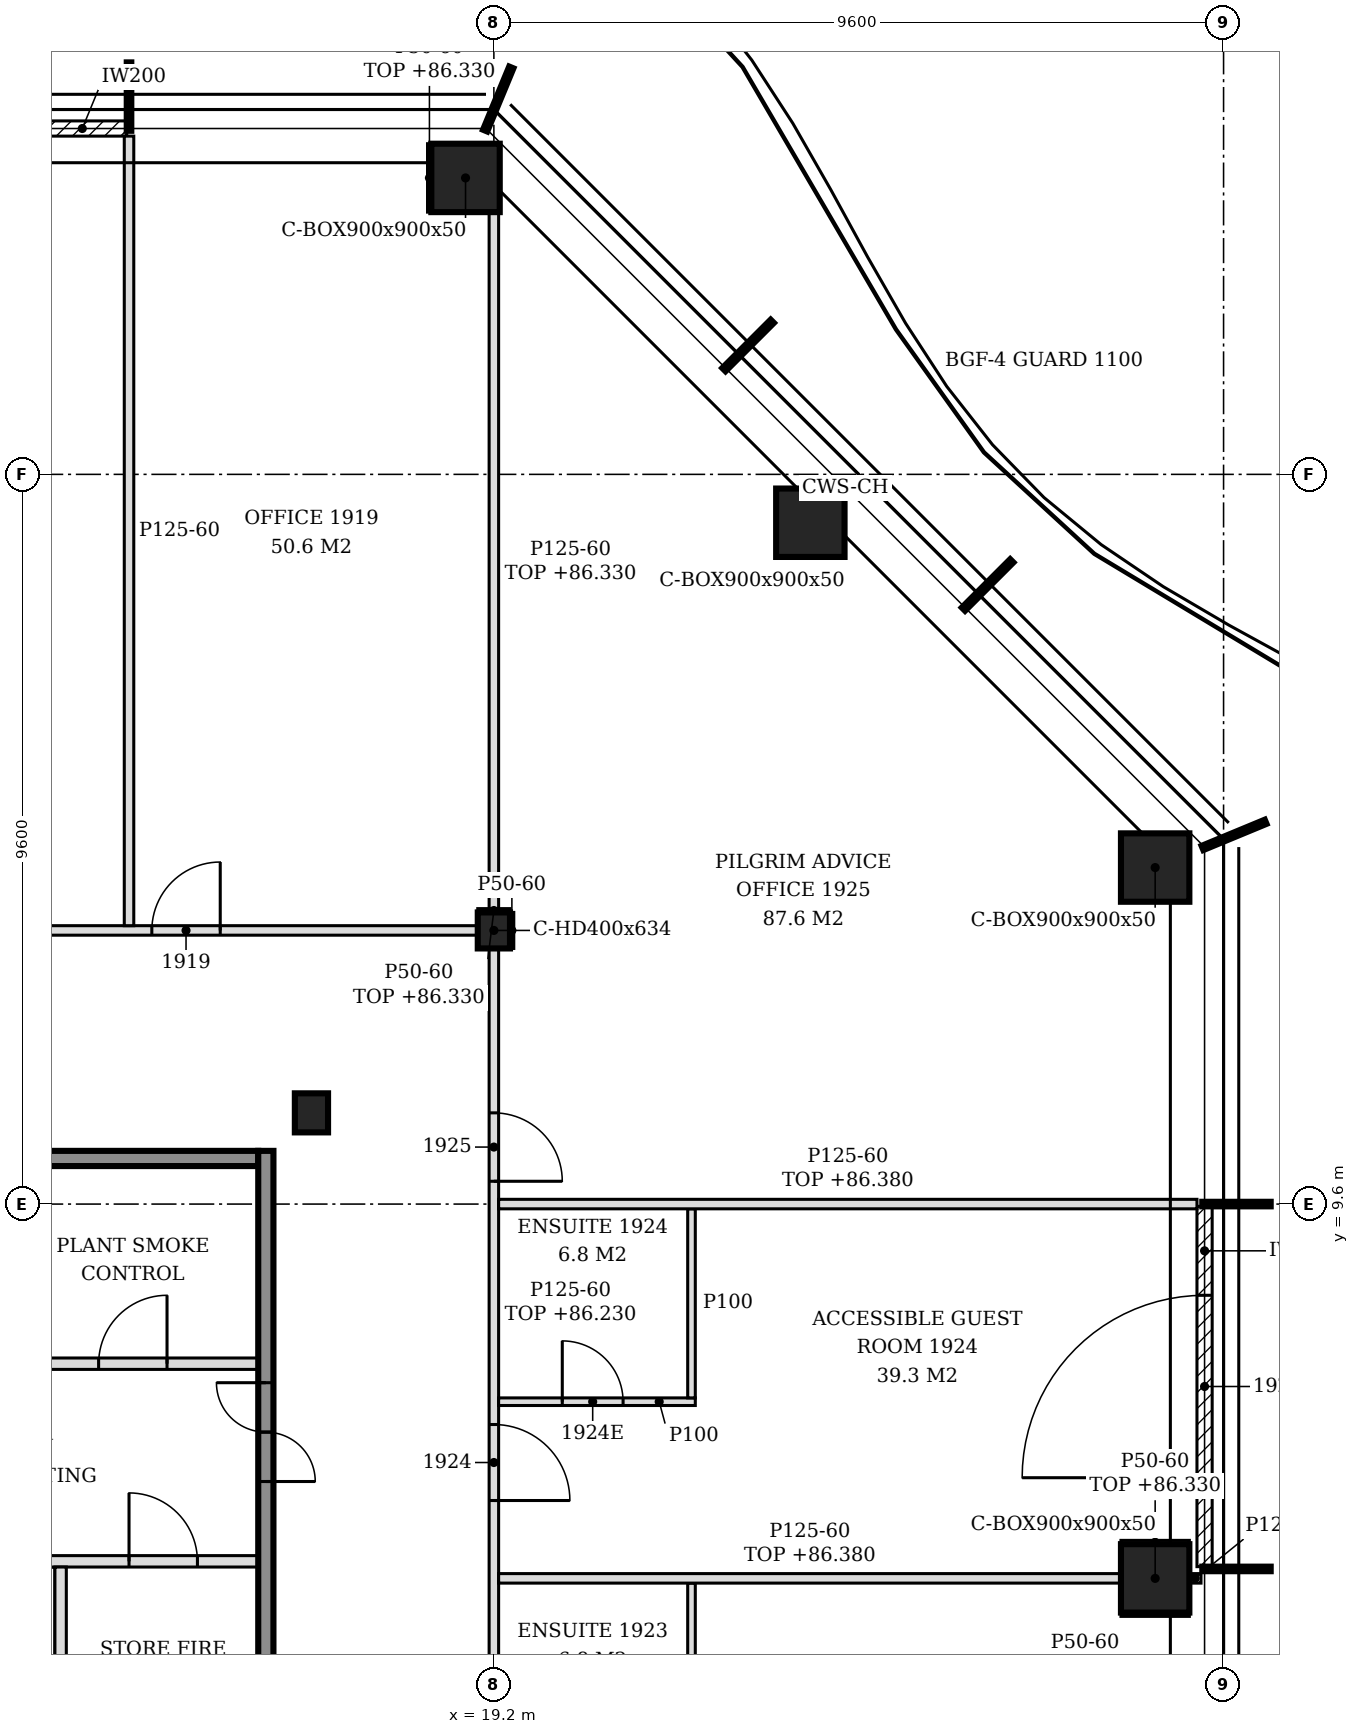
"""IFC4 building model, lengths in metres.
Left out: names, types, materials, properties, quantities, classifications, styles, units other than length and angle.
Written with IfcOpenShell. Run it as: python <this file> out.ifc"""

import sys

from ifc_helpers import new_model, si_unit, direction, frame, frame_2d, origin, origin_2d, place, context, subcontext, project, spatial, polyline, rectangle, hollow_rectangle, i_section, outline, extrude, clip, halfspace, element, fill, save


model = new_model("IFC4")
c1 = context("Model", 3, precision=1e-05, world=origin(), true_north=direction((0.0, 1.0)))
c2 = subcontext(c1, "Body", "Model", "MODEL_VIEW")
j1 = project(units=[si_unit("LENGTHUNIT", "METRE"), si_unit("PLANEANGLEUNIT", "RADIAN")], contexts=[c1])
p1 = place(None, origin())
s1 = spatial("IfcSite", under=j1, at=p1, CompositionType="ELEMENT")
p2 = place(p1, origin())
s2 = spatial("IfcBuilding", under=s1, at=p2, CompositionType="ELEMENT")
p3 = place(p2, frame((0.0, 0.0, 83.4)))
s3 = spatial("IfcBuildingStorey", under=s2, at=p3, CompositionType="ELEMENT", Elevation=83.4)
for number, where, z_axis, x_axis in (
    (1, (27.9, 4.676, -0.15), (0.0, 0.0, 1.0), (1.0, 0.0, 0.0)),
    (2, (27.9, 14.027, -0.15), (0.0, 0.0, 1.0), (1.0, 0.0, 0.0)),
    (3, (23.364, 18.564, -0.15), (0.0, 0.0, 1.0), (1.0, 0.0, 0.0)),
    (4, (18.827, 23.1, -0.15), (0.0, 0.0, 1.0), (1.0, 0.0, 0.0)),
):
    element("IfcColumn", number, at=place(p3, frame(where, z_axis=z_axis, x_axis=x_axis)), inside=s3, PredefinedType="COLUMN", context=c2, shape_type="Clipping", body=[
        clip(extrude(hollow_rectangle(XDim=0.9, YDim=0.9, WallThickness=0.05, at=origin_2d()), origin(), (0.0, 0.0, 1.0), 3.6), halfspace(frame((0.0, 0.0, 3.576), z_axis=(0.0, 0.0, 1.0), x_axis=(1.0, 0.0, 0.0)), False)),
    ])
p4 = place(p3, frame((19.2, 13.2, -0.15), z_axis=(0.0, 0.0, 1.0), x_axis=(1.0, 0.0, 0.0)))
e5 = element("IfcColumn", 5, at=p4, inside=s3, PredefinedType="COLUMN", context=c2, shape_type="SweptSolid", body=[
    extrude(i_section(OverallWidth=0.424, OverallDepth=0.474, WebThickness=0.048, FlangeThickness=0.077, FilletRadius=0.015, at=origin_2d()), origin(), (0.0, 0.0, 1.0), 3.6),
])
p5 = place(p3, frame((16.8, 10.8, -0.15), z_axis=(0.0, 0.0, 1.0), x_axis=(1.0, 0.0, 0.0)))
e6 = element("IfcColumn", 6, at=p5, inside=s3, PredefinedType="COLUMN", context=c2, shape_type="SweptSolid", body=[
    extrude(i_section(OverallWidth=0.437, OverallDepth=0.514, WebThickness=0.061, FlangeThickness=0.097, FilletRadius=0.015, at=origin_2d()), origin(), (0.0, 0.0, 1.0), 3.6),
])
p6 = place(p3, frame((28.55, 4.83, 0.0), z_axis=(0.0, 0.0, 1.0), x_axis=(0.0, 1.0, 0.0)))
e7 = element("IfcWall", 7, at=p6, inside=s3, PredefinedType="NOTDEFINED", context=c2, shape_type="SweptSolid", body=[
    extrude(rectangle(XDim=4.74, YDim=0.2, at=frame_2d((2.37, 0.0))), origin(), (0.0, 0.0, 1.0), 3.45),
])
p7 = place(p6, frame((1.17, 0.0, 0.0)))
e8 = element("IfcOpeningElement", 8, at=p7, cuts=e7, PredefinedType="OPENING", context=c2, shape_type="SweptSolid", body=[
    extrude(rectangle(XDim=2.4, YDim=2.4, at=frame_2d((1.2, 1.2))), frame((0.0, 0.11, 0.0), z_axis=(0.0, -1.0, 0.0), x_axis=(1.0, 0.0, 0.0)), (0.0, 0.0, 1.0), 0.22),
])
p8 = place(p3, frame((14.37, 23.75, 0.0), z_axis=(0.0, 0.0, 1.0), x_axis=(-1.0, 0.0, 0.0)))
e9 = element("IfcWall", 9, at=p8, inside=s3, PredefinedType="NOTDEFINED", context=c2, shape_type="SweptSolid", body=[
    extrude(rectangle(XDim=4.74, YDim=0.2, at=frame_2d((2.37, 0.0))), origin(), (0.0, 0.0, 1.0), 3.45),
])
p9 = place(p8, frame((1.17, 0.0, 0.0)))
e10 = element("IfcOpeningElement", 10, at=p9, cuts=e9, PredefinedType="OPENING", context=c2, shape_type="SweptSolid", body=[
    extrude(rectangle(XDim=2.4, YDim=2.4, at=frame_2d((1.2, 1.2))), frame((0.0, 0.11, 0.0), z_axis=(0.0, -1.0, 0.0), x_axis=(1.0, 0.0, 0.0)), (0.0, 0.0, 1.0), 0.22),
])
p10 = place(p3, frame((9.7, 4.9, 0.0), z_axis=(0.0, 0.0, 1.0), x_axis=(1.0, 0.0, 0.0)))
e11 = element("IfcWall", 11, at=p10, inside=s3, PredefinedType="SOLIDWALL", context=c2, shape_type="SweptSolid", body=[
    extrude(rectangle(XDim=6.4, YDim=0.15, at=frame_2d((3.2, 0.0))), origin(), (0.0, 0.0, 1.0), 3.45),
])
p11 = place(p10, frame((0.45, 0.0, 0.0)))
e12 = element("IfcOpeningElement", 12, at=p11, cuts=e11, PredefinedType="OPENING", context=c2, shape_type="SweptSolid", body=[
    extrude(rectangle(XDim=1.0, YDim=2.1, at=frame_2d((0.5, 1.05))), frame((0.0, 0.085, 0.0), z_axis=(0.0, -1.0, 0.0), x_axis=(1.0, 0.0, 0.0)), (0.0, 0.0, 1.0), 0.17),
])
p12 = place(p10, frame((2.35, 0.0, 0.0)))
e13 = element("IfcOpeningElement", 13, at=p12, cuts=e11, PredefinedType="OPENING", context=c2, shape_type="SweptSolid", body=[
    extrude(rectangle(XDim=1.0, YDim=2.1, at=frame_2d((0.5, 1.05))), frame((0.0, 0.085, 0.0), z_axis=(0.0, -1.0, 0.0), x_axis=(1.0, 0.0, 0.0)), (0.0, 0.0, 1.0), 0.17),
])
p13 = place(p10, frame((4.7, 0.0, 0.0)))
e14 = element("IfcOpeningElement", 14, at=p13, cuts=e11, PredefinedType="OPENING", context=c2, shape_type="SweptSolid", body=[
    extrude(rectangle(XDim=0.9, YDim=2.1, at=frame_2d((0.45, 1.05))), frame((0.0, 0.085, 0.0), z_axis=(0.0, -1.0, 0.0), x_axis=(1.0, 0.0, 0.0)), (0.0, 0.0, 1.0), 0.17),
])
p14 = place(p3, frame((12.7, 7.5, 0.0), z_axis=(0.0, 0.0, 1.0), x_axis=(1.0, 0.0, 0.0)))
e15 = element("IfcWall", 15, at=p14, inside=s3, PredefinedType="SOLIDWALL", context=c2, shape_type="SweptSolid", body=[
    extrude(rectangle(XDim=3.4, YDim=0.15, at=frame_2d((1.7, 0.0))), origin(), (0.0, 0.0, 1.0), 3.45),
])
p15 = place(p14, frame((1.3, 0.0, 0.0)))
e16 = element("IfcOpeningElement", 16, at=p15, cuts=e15, PredefinedType="OPENING", context=c2, shape_type="SweptSolid", body=[
    extrude(rectangle(XDim=0.9, YDim=2.1, at=frame_2d((0.45, 1.05))), frame((0.0, 0.085, 0.0), z_axis=(0.0, -1.0, 0.0), x_axis=(1.0, 0.0, 0.0)), (0.0, 0.0, 1.0), 0.17),
])
p16 = place(p3, frame((12.7, 10.2, 0.0), z_axis=(0.0, 0.0, 1.0), x_axis=(1.0, 0.0, 0.0)))
e17 = element("IfcWall", 17, at=p16, inside=s3, PredefinedType="SOLIDWALL", context=c2, shape_type="SweptSolid", body=[
    extrude(rectangle(XDim=3.4, YDim=0.2, at=frame_2d((1.7, 0.0))), origin(), (0.0, 0.0, 1.0), 3.45),
])
p17 = place(p3, frame((13.5, 2.275, 0.0), z_axis=(0.0, 0.0, 1.0), x_axis=(0.0, 1.0, 0.0)))
e18 = element("IfcWall", 18, at=p17, inside=s3, PredefinedType="SOLIDWALL", context=c2, shape_type="SweptSolid", body=[
    extrude(rectangle(XDim=2.55, YDim=0.15, at=frame_2d((1.275, 0.0))), origin(), (0.0, 0.0, 1.0), 3.45),
])
p18 = place(p3, frame((16.2, -5.5, 0.0), z_axis=(0.0, 0.0, 1.0), x_axis=(0.0, 1.0, 0.0)))
e19 = element("IfcWall", 19, at=p18, inside=s3, PredefinedType="SOLIDWALL", context=c2, shape_type="SweptSolid", body=[
    extrude(rectangle(XDim=15.8, YDim=0.2, at=frame_2d((7.9, 0.0))), origin(), (0.0, 0.0, 1.0), 3.45),
])
p19 = place(p18, frame((3.05, 0.0, 0.0)))
e20 = element("IfcOpeningElement", 20, at=p19, cuts=e19, PredefinedType="OPENING", context=c2, shape_type="SweptSolid", body=[
    extrude(rectangle(XDim=1.3, YDim=2.1, at=frame_2d((0.65, 1.05))), frame((0.0, 0.11, 0.0), z_axis=(0.0, -1.0, 0.0), x_axis=(1.0, 0.0, 0.0)), (0.0, 0.0, 1.0), 0.22),
])
p20 = place(p18, frame((11.45, 0.0, 0.0)))
e21 = element("IfcOpeningElement", 21, at=p20, cuts=e19, PredefinedType="OPENING", context=c2, shape_type="SweptSolid", body=[
    extrude(rectangle(XDim=1.3, YDim=2.1, at=frame_2d((0.65, 1.05))), frame((0.0, 0.11, 0.0), z_axis=(0.0, -1.0, 0.0), x_axis=(1.0, 0.0, 0.0)), (0.0, 0.0, 1.0), 0.22),
])
p21 = place(p3, frame((21.8, 2.126, 0.0), z_axis=(0.0, 0.0, 1.0), x_axis=(0.0, 1.0, 0.0)))
e22 = element("IfcWall", 22, at=p21, inside=s3, PredefinedType="PARTITIONING", context=c2, shape_type="SweptSolid", body=[
    extrude(rectangle(XDim=2.488, YDim=0.1, at=frame_2d((1.244, 0.0))), origin(), (0.0, 0.0, 1.0), 3.45),
])
p22 = place(p3, frame((19.2, 2.637, 0.0), z_axis=(0.0, 0.0, 1.0), x_axis=(0.0, 1.0, 0.0)))
e23 = element("IfcWall", 23, at=p22, inside=s3, PredefinedType="PARTITIONING", context=c2, shape_type="SweptSolid", body=[
    extrude(rectangle(XDim=10.326, YDim=0.125, at=frame_2d((5.163, 0.0))), origin(), (0.0, 0.0, 1.0), 2.83),
])
p23 = place(p22, frame((3.063, 0.0, 0.0)))
e24 = element("IfcOpeningElement", 24, at=p23, cuts=e23, PredefinedType="OPENING", context=c2, shape_type="SweptSolid", body=[
    extrude(rectangle(XDim=1.0, YDim=2.1, at=frame_2d((0.5, 1.05))), frame((0.0, 0.073, 0.0), z_axis=(0.0, -1.0, 0.0), x_axis=(1.0, 0.0, 0.0)), (0.0, 0.0, 1.0), 0.145),
])
p24 = place(p22, frame((7.263, 0.0, 0.0)))
e25 = element("IfcOpeningElement", 25, at=p24, cuts=e23, PredefinedType="OPENING", context=c2, shape_type="SweptSolid", body=[
    extrude(rectangle(XDim=0.9, YDim=2.1, at=frame_2d((0.45, 1.05))), frame((0.0, 0.073, 0.0), z_axis=(0.0, -1.0, 0.0), x_axis=(1.0, 0.0, 0.0)), (0.0, 0.0, 1.0), 0.145),
])
p25 = place(p3, frame((19.262, 4.676, 0.0), z_axis=(0.0, 0.0, 1.0), x_axis=(1.0, 0.0, 0.0)))
e26 = element("IfcWall", 26, at=p25, inside=s3, PredefinedType="PARTITIONING", context=c2, shape_type="SweptSolid", body=[
    extrude(outline(polyline([(0.0, 0.0), (8.188, 0.0), (8.188, 2.98), (0.087, 2.98), (0.085, 2.83), (0.0, 2.83), (0.0, 0.0)])), frame((0.0, 0.062, 0.0), z_axis=(0.0, -1.0, 0.0), x_axis=(1.0, 0.0, 0.0)), (0.0, 0.0, 1.0), 0.125),
])
p26 = place(p3, frame((28.35, 4.676, 0.0), z_axis=(0.0, 0.0, 1.0), x_axis=(1.0, 0.0, 0.0)))
e27 = element("IfcWall", 27, at=p26, inside=s3, PredefinedType="PARTITIONING", context=c2, shape_type="SweptSolid", body=[
    extrude(rectangle(XDim=0.153, YDim=0.125, at=frame_2d((0.076, 0.0))), origin(), (0.0, 0.0, 1.0), 3.45),
])
p27 = place(p3, frame((19.262, 7.0, 0.0), z_axis=(0.0, 0.0, 1.0), x_axis=(1.0, 0.0, 0.0)))
e28 = element("IfcWall", 28, at=p27, inside=s3, PredefinedType="PARTITIONING", context=c2, shape_type="SweptSolid", body=[
    extrude(outline(polyline([(0.0, 0.0), (2.588, 0.0), (2.587, 3.45), (0.087, 3.45), (0.085, 2.83), (0.0, 2.83), (0.0, 0.0)])), frame((0.0, 0.05, 0.0), z_axis=(0.0, -1.0, 0.0), x_axis=(1.0, 0.0, 0.0)), (0.0, 0.0, 1.0), 0.1),
])
p28 = place(p27, frame((0.837, 0.0, 0.0)))
e29 = element("IfcOpeningElement", 29, at=p28, cuts=e28, PredefinedType="OPENING", context=c2, shape_type="SweptSolid", body=[
    extrude(rectangle(XDim=0.8, YDim=2.1, at=frame_2d((0.4, 1.05))), frame((0.0, 0.06, 0.0), z_axis=(0.0, -1.0, 0.0), x_axis=(1.0, 0.0, 0.0)), (0.0, 0.0, 1.0), 0.12),
])
p29 = place(p3, frame((21.8, 7.05, 0.0), z_axis=(0.0, 0.0, 1.0), x_axis=(0.0, 1.0, 0.0)))
e30 = element("IfcWall", 30, at=p29, inside=s3, PredefinedType="PARTITIONING", context=c2, shape_type="SweptSolid", body=[
    extrude(outline(polyline([(0.0, 0.0), (2.488, 0.0), (2.488, 2.98), (2.455, 2.98), (2.453, 3.45), (0.0, 3.45), (0.0, 0.0)])), frame((0.0, 0.05, 0.0), z_axis=(0.0, -1.0, 0.0), x_axis=(1.0, 0.0, 0.0)), (0.0, 0.0, 1.0), 0.1),
])
p30 = place(p3, frame((19.262, 9.6, 0.0), z_axis=(0.0, 0.0, 1.0), x_axis=(1.0, 0.0, 0.0)))
e31 = element("IfcWall", 31, at=p30, inside=s3, PredefinedType="PARTITIONING", context=c2, shape_type="SweptSolid", body=[
    extrude(outline(polyline([(0.0, 0.0), (9.188, 0.0), (9.188, 2.98), (8.788, 2.98), (8.785, 2.93), (8.488, 2.93), (8.486, 2.98), (0.087, 2.98), (0.085, 2.83), (0.0, 2.83), (0.0, 0.0)])), frame((0.0, 0.062, 0.0), z_axis=(0.0, -1.0, 0.0), x_axis=(1.0, 0.0, 0.0)), (0.0, 0.0, 1.0), 0.125),
])
p31 = place(p3, frame((7.412, 13.2, 0.0), z_axis=(0.0, 0.0, 1.0), x_axis=(1.0, 0.0, 0.0)))
e32 = element("IfcWall", 32, at=p31, inside=s3, PredefinedType="PARTITIONING", context=c2, shape_type="SweptSolid", body=[
    extrude(rectangle(XDim=11.576, YDim=0.125, at=frame_2d((5.788, 0.0))), origin(), (0.0, 0.0, 1.0), 2.83),
])
p32 = place(p31, frame((1.588, 0.0, 0.0)))
e33 = element("IfcOpeningElement", 33, at=p32, cuts=e32, PredefinedType="OPENING", context=c2, shape_type="SweptSolid", body=[
    extrude(rectangle(XDim=0.9, YDim=2.1, at=frame_2d((0.45, 1.05))), frame((0.0, 0.073, 0.0), z_axis=(0.0, -1.0, 0.0), x_axis=(1.0, 0.0, 0.0)), (0.0, 0.0, 1.0), 0.145),
])
p33 = place(p31, frame((7.288, 0.0, 0.0)))
e34 = element("IfcOpeningElement", 34, at=p33, cuts=e32, PredefinedType="OPENING", context=c2, shape_type="SweptSolid", body=[
    extrude(rectangle(XDim=0.9, YDim=2.1, at=frame_2d((0.45, 1.05))), frame((0.0, 0.073, 0.0), z_axis=(0.0, -1.0, 0.0), x_axis=(1.0, 0.0, 0.0)), (0.0, 0.0, 1.0), 0.145),
])
p34 = place(p3, frame((14.4, 13.262, 0.0), z_axis=(0.0, 0.0, 1.0), x_axis=(0.0, 1.0, 0.0)))
e35 = element("IfcWall", 35, at=p34, inside=s3, PredefinedType="PARTITIONING", context=c2, shape_type="SweptSolid", body=[
    extrude(outline(polyline([(0.0, 0.0), (10.387, 0.0), (10.387, 3.45), (9.988, 3.45), (9.986, 2.93), (9.688, 2.93), (9.686, 3.45), (6.042, 3.45), (6.041, 2.88), (5.833, 2.88), (5.831, 3.45), (0.087, 3.45), (0.085, 2.83), (0.0, 2.83), (0.0, 0.0)])), frame((0.0, 0.062, 0.0), z_axis=(0.0, -1.0, 0.0), x_axis=(1.0, 0.0, 0.0)), (0.0, 0.0, 1.0), 0.125),
])
p35 = place(p3, frame((19.2, 13.437, 0.0), z_axis=(0.0, 0.0, 1.0), x_axis=(0.0, 1.0, 0.0)))
e36 = element("IfcWall", 36, at=p35, inside=s3, PredefinedType="PARTITIONING", context=c2, shape_type="SweptSolid", body=[
    extrude(outline(polyline([(0.0, 0.0), (9.213, 0.0), (9.213, 2.63), (8.733, 2.63), (8.731, 2.93), (0.0, 2.93), (0.0, 0.0)])), frame((0.0, 0.062, 0.0), z_axis=(0.0, -1.0, 0.0), x_axis=(1.0, 0.0, 0.0)), (0.0, 0.0, 1.0), 0.125),
])
p36 = place(p3, frame((19.437, 12.963, 0.0), z_axis=(0.0, 0.0, 1.0), x_axis=(0.0, 1.0, 0.0)))
e37 = element("IfcWall", 37, at=p36, inside=s3, PredefinedType="PARTITIONING", context=c2, shape_type="SweptSolid", body=[
    extrude(rectangle(XDim=0.474, YDim=0.05, at=frame_2d((0.237, 0.0))), origin(), (0.0, 0.0, 1.0), 3.45),
])
for number, where, z_axis, x_axis in (
    (38, (27.45, 5.151, 0.0), (0.0, 0.0, 1.0), (1.0, 0.0, 0.0)),
    (39, (27.45, 4.201, 0.0), (0.0, 0.0, 1.0), (1.0, 0.0, 0.0)),
):
    element("IfcWall", number, at=place(p3, frame(where, z_axis=z_axis, x_axis=x_axis)), inside=s3, PredefinedType="PARTITIONING", context=c2, shape_type="SweptSolid", body=[
        extrude(rectangle(XDim=0.9, YDim=0.05, at=frame_2d((0.45, 0.0))), origin(), (0.0, 0.0, 1.0), 2.93),
    ])
p37 = place(p3, frame((18.988, 13.462, 0.0), z_axis=(0.0, 0.0, 1.0), x_axis=(1.0, 0.0, 0.0)))
e40 = element("IfcWall", 40, at=p37, inside=s3, PredefinedType="PARTITIONING", context=c2, shape_type="SweptSolid", body=[
    extrude(rectangle(XDim=0.424, YDim=0.05, at=frame_2d((0.212, 0.0))), origin(), (0.0, 0.0, 1.0), 2.93),
])
p38 = place(p3, frame((18.352, 22.65, 0.0), z_axis=(0.0, 0.0, 1.0), x_axis=(0.0, 1.0, 0.0)))
e41 = element("IfcWall", 41, at=p38, inside=s3, PredefinedType="PARTITIONING", context=c2, shape_type="SweptSolid", body=[
    extrude(rectangle(XDim=0.9, YDim=0.05, at=frame_2d((0.45, 0.0))), origin(), (0.0, 0.0, 1.0), 2.93),
])
p39 = place(p7, origin())
e42 = element("IfcDoor", 42, at=p39, inside=s3, OperationType="SINGLE_SWING_LEFT", PredefinedType="DOOR", context=c2, shape_type="SweptSolid", body=[
    extrude(rectangle(XDim=2.4, YDim=2.4, at=frame_2d((1.2, 1.2))), frame((0.0, 0.025, 0.0), z_axis=(0.0, -1.0, 0.0), x_axis=(1.0, 0.0, 0.0)), (0.0, 0.0, 1.0), 0.05),
])
fill(e8, e42)
p40 = place(p20, origin())
e43 = element("IfcDoor", 43, at=p40, inside=s3, OperationType="DOUBLE_DOOR_SINGLE_SWING", PredefinedType="DOOR", context=c2, shape_type="SweptSolid", body=[
    extrude(rectangle(XDim=1.3, YDim=2.1, at=frame_2d((0.65, 1.05))), frame((0.0, 0.025, 0.0), z_axis=(0.0, -1.0, 0.0), x_axis=(1.0, 0.0, 0.0)), (0.0, 0.0, 1.0), 0.05),
])
fill(e21, e43)
p41 = place(p13, origin())
e44 = element("IfcDoor", 44, at=p41, inside=s3, OperationType="SINGLE_SWING_LEFT", PredefinedType="DOOR", context=c2, shape_type="SweptSolid", body=[
    extrude(rectangle(XDim=0.9, YDim=2.1, at=frame_2d((0.45, 1.05))), frame((0.0, 0.025, 0.0), z_axis=(0.0, -1.0, 0.0), x_axis=(1.0, 0.0, 0.0)), (0.0, 0.0, 1.0), 0.05),
])
fill(e14, e44)
p42 = place(p15, origin())
e45 = element("IfcDoor", 45, at=p42, inside=s3, OperationType="SINGLE_SWING_RIGHT", PredefinedType="DOOR", context=c2, shape_type="SweptSolid", body=[
    extrude(rectangle(XDim=0.9, YDim=2.1, at=frame_2d((0.45, 1.05))), frame((0.0, 0.025, 0.0), z_axis=(0.0, -1.0, 0.0), x_axis=(1.0, 0.0, 0.0)), (0.0, 0.0, 1.0), 0.05),
])
fill(e16, e45)
p43 = place(p33, origin())
e46 = element("IfcDoor", 46, at=p43, inside=s3, OperationType="SINGLE_SWING_RIGHT", PredefinedType="DOOR", context=c2, shape_type="SweptSolid", body=[
    extrude(rectangle(XDim=0.9, YDim=2.1, at=frame_2d((0.45, 1.05))), frame((0.0, 0.025, 0.0), z_axis=(0.0, -1.0, 0.0), x_axis=(1.0, 0.0, 0.0)), (0.0, 0.0, 1.0), 0.05),
])
fill(e34, e46)
p44 = place(p23, frame((1.0, 0.0, 0.0), z_axis=(0.0, 0.0, 1.0), x_axis=(-1.0, 0.0, 0.0)))
e47 = element("IfcDoor", 47, at=p44, inside=s3, OperationType="SINGLE_SWING_RIGHT", PredefinedType="DOOR", context=c2, shape_type="SweptSolid", body=[
    extrude(rectangle(XDim=1.0, YDim=2.1, at=frame_2d((0.5, 1.05))), frame((0.0, 0.025, 0.0), z_axis=(0.0, -1.0, 0.0), x_axis=(1.0, 0.0, 0.0)), (0.0, 0.0, 1.0), 0.05),
])
fill(e24, e47)
p45 = place(p28, origin())
e48 = element("IfcDoor", 48, at=p45, inside=s3, OperationType="SINGLE_SWING_LEFT", PredefinedType="DOOR", context=c2, shape_type="SweptSolid", body=[
    extrude(rectangle(XDim=0.8, YDim=2.1, at=frame_2d((0.4, 1.05))), frame((0.0, 0.025, 0.0), z_axis=(0.0, -1.0, 0.0), x_axis=(1.0, 0.0, 0.0)), (0.0, 0.0, 1.0), 0.05),
])
fill(e29, e48)
p46 = place(p24, frame((0.9, 0.0, 0.0), z_axis=(0.0, 0.0, 1.0), x_axis=(-1.0, 0.0, 0.0)))
e49 = element("IfcDoor", 49, at=p46, inside=s3, OperationType="SINGLE_SWING_RIGHT", PredefinedType="DOOR", context=c2, shape_type="SweptSolid", body=[
    extrude(rectangle(XDim=0.9, YDim=2.1, at=frame_2d((0.45, 1.05))), frame((0.0, 0.025, 0.0), z_axis=(0.0, -1.0, 0.0), x_axis=(1.0, 0.0, 0.0)), (0.0, 0.0, 1.0), 0.05),
])
fill(e25, e49)
save(model, sys.argv[1])
